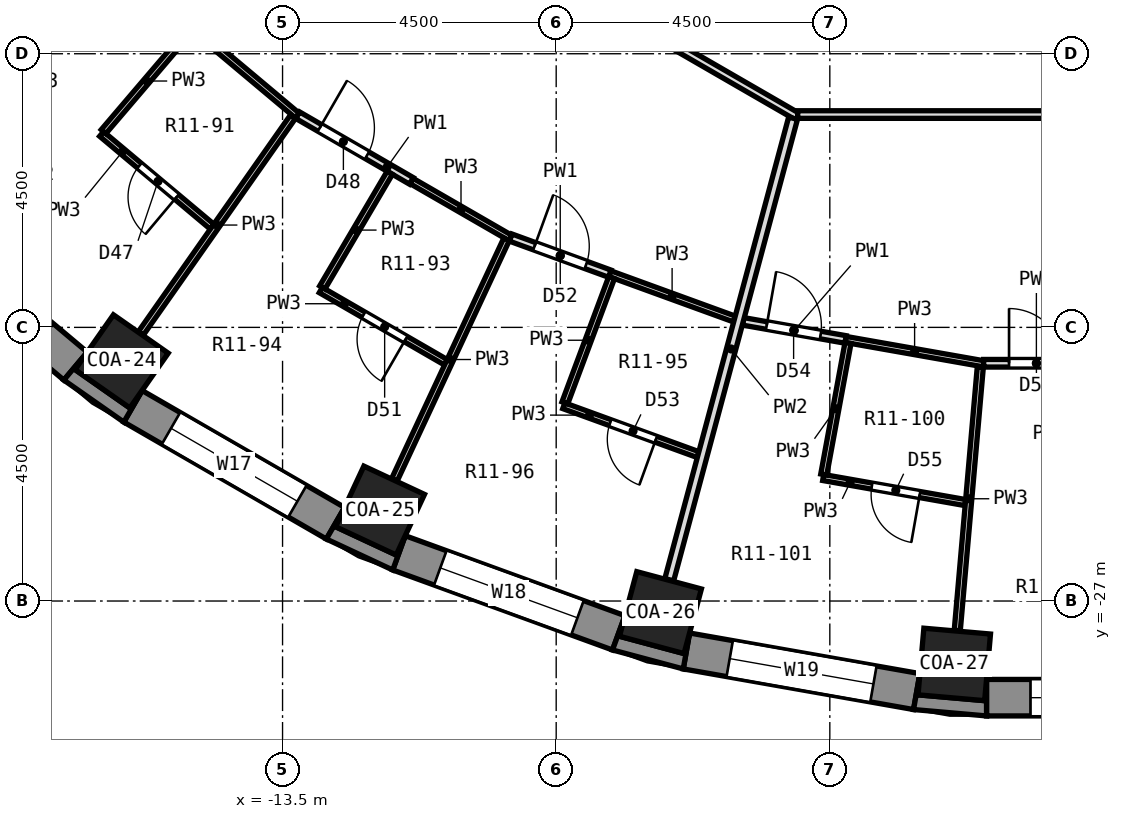
"""IFC4 building model, lengths in metres.
Left out: names, types, materials, properties, quantities, classifications, styles, units other than length and angle.
Written with IfcOpenShell. Run it as: python <this file> out.ifc"""

import sys

from ifc_helpers import new_model, si_unit, direction, frame, frame_2d, origin, origin_2d, place, context, subcontext, project, spatial, polyline, rectangle, outline, extrude, element, fill, save


model = new_model("IFC4")
c1 = context("Model", 3, precision=1e-05, world=origin(), true_north=direction((0.0, 1.0)))
c2 = subcontext(c1, "Body", "Model", "MODEL_VIEW")
j1 = project(units=[si_unit("LENGTHUNIT", "METRE"), si_unit("PLANEANGLEUNIT", "RADIAN")], contexts=[c1])
p1 = place(None, origin())
s1 = spatial("IfcSite", under=j1, at=p1, CompositionType="ELEMENT")
p2 = place(p1, origin())
s2 = spatial("IfcBuilding", under=s1, at=p2, CompositionType="ELEMENT")
p3 = place(p2, frame((0.0, 0.0, 46.1)))
s3 = spatial("IfcBuildingStorey", under=s2, at=p3, CompositionType="ELEMENT", Elevation=46.1)
for number, where, z_axis, x_axis in (
    (1, (-16.146, -23.059, 0.0), (0.0, 0.0, 1.0), (-0.574, -0.819, 0.0)),
    (2, (-11.897, -25.512, 0.0), (0.0, 0.0, 1.0), (-0.423, -0.906, 0.0)),
    (3, (-7.286, -27.191, 0.0), (0.0, 0.0, 1.0), (-0.259, -0.966, 0.0)),
    (4, (-2.453, -28.043, 0.0), (0.0, 0.0, 1.0), (-0.087, -0.996, 0.0)),
):
    element("IfcColumn", number, at=place(p3, frame(where, z_axis=z_axis, x_axis=x_axis)), inside=s3, PredefinedType="COLUMN", context=c2, shape_type="SweptSolid", body=[
        extrude(rectangle(XDim=1.1, YDim=1.1, at=origin_2d()), origin(), (0.0, 0.0, 1.0), 3.3),
    ])
p4 = place(p3, frame((-19.85, -20.665, 0.0), z_axis=(0.0, 0.0, 1.0), x_axis=(0.766026164483, -0.642809392687, 0.0)))
e5 = element("IfcWall", 5, at=p4, inside=s3, PredefinedType="SOLIDWALL", context=c2, shape_type="SweptSolid", body=[
    extrude(rectangle(XDim=3.846, YDim=0.6, at=frame_2d((1.923, 0.0))), origin(), (0.0, 0.0, 1.0), 2.75),
])
p5 = place(p4, frame((0.723, 0.0, 0.9)))
e6 = element("IfcOpeningElement", 6, at=p5, cuts=e5, PredefinedType="OPENING", context=c2, shape_type="SweptSolid", body=[
    extrude(rectangle(XDim=2.4, YDim=1.8, at=frame_2d((1.2, 0.9))), frame((0.0, 0.312, 0.0), z_axis=(0.0, -1.0, 0.0), x_axis=(1.0, 0.0, 0.0)), (0.0, 0.0, 1.0), 0.624),
])
p6 = place(p3, frame((-15.96, -23.798, 0.0), z_axis=(0.0, 0.0, 1.0), x_axis=(0.86603124159, -0.499989888488, 0.0)))
e7 = element("IfcWall", 7, at=p6, inside=s3, PredefinedType="SOLIDWALL", context=c2, shape_type="SweptSolid", body=[
    extrude(rectangle(XDim=3.846, YDim=0.6, at=frame_2d((1.923, 0.0))), origin(), (0.0, 0.0, 1.0), 2.75),
])
p7 = place(p6, frame((0.723, 0.0, 0.9)))
e8 = element("IfcOpeningElement", 8, at=p7, cuts=e7, PredefinedType="OPENING", context=c2, shape_type="SweptSolid", body=[
    extrude(rectangle(XDim=2.4, YDim=1.8, at=frame_2d((1.2, 0.9))), frame((0.0, 0.312, 0.0), z_axis=(0.0, -1.0, 0.0), x_axis=(1.0, 0.0, 0.0)), (0.0, 0.0, 1.0), 0.624),
])
p8 = place(p3, frame((-11.585, -26.208, 0.0), z_axis=(0.0, 0.0, 1.0), x_axis=(0.939689588564, -0.342028474173, 0.0)))
e9 = element("IfcWall", 9, at=p8, inside=s3, PredefinedType="SOLIDWALL", context=c2, shape_type="SweptSolid", body=[
    extrude(rectangle(XDim=3.846, YDim=0.6, at=frame_2d((1.923, 0.0))), origin(), (0.0, 0.0, 1.0), 2.75),
])
p9 = place(p8, frame((0.723, 0.0, 0.9)))
e10 = element("IfcOpeningElement", 10, at=p9, cuts=e9, PredefinedType="OPENING", context=c2, shape_type="SweptSolid", body=[
    extrude(rectangle(XDim=2.4, YDim=1.8, at=frame_2d((1.2, 0.9))), frame((0.0, 0.312, 0.0), z_axis=(0.0, -1.0, 0.0), x_axis=(1.0, 0.0, 0.0)), (0.0, 0.0, 1.0), 0.624),
])
p10 = place(p3, frame((-6.858, -27.821, 0.0), z_axis=(0.0, 0.0, 1.0), x_axis=(0.984800809218, -0.173687553279, 0.0)))
e11 = element("IfcWall", 11, at=p10, inside=s3, PredefinedType="SOLIDWALL", context=c2, shape_type="SweptSolid", body=[
    extrude(rectangle(XDim=3.846, YDim=0.6, at=frame_2d((1.923, 0.0))), origin(), (0.0, 0.0, 1.0), 2.75),
])
p11 = place(p10, frame((0.723, 0.0, 0.9)))
e12 = element("IfcOpeningElement", 12, at=p11, cuts=e11, PredefinedType="OPENING", context=c2, shape_type="SweptSolid", body=[
    extrude(rectangle(XDim=2.4, YDim=1.8, at=frame_2d((1.2, 0.9))), frame((0.0, 0.312, 0.0), z_axis=(0.0, -1.0, 0.0), x_axis=(1.0, 0.0, 0.0)), (0.0, 0.0, 1.0), 0.624),
])
p12 = place(p3, frame((-1.923, -28.59, 0.0), z_axis=(0.0, 0.0, 1.0), x_axis=(1.0, 0.0, 0.0)))
e13 = element("IfcWall", 13, at=p12, inside=s3, PredefinedType="SOLIDWALL", context=c2, shape_type="SweptSolid", body=[
    extrude(rectangle(XDim=3.846, YDim=0.6, at=frame_2d((1.923, 0.0))), origin(), (0.0, 0.0, 1.0), 2.75),
])
p13 = place(p12, frame((0.723, 0.0, 0.9)))
e14 = element("IfcOpeningElement", 14, at=p13, cuts=e13, PredefinedType="OPENING", context=c2, shape_type="SweptSolid", body=[
    extrude(rectangle(XDim=2.4, YDim=1.8, at=frame_2d((1.2, 0.9))), frame((0.0, 0.312, 0.0), z_axis=(0.0, -1.0, 0.0), x_axis=(1.0, 0.0, 0.0)), (0.0, 0.0, 1.0), 0.624),
])
p14 = place(p3, origin())
e15 = element("IfcWall", 15, at=p14, inside=s3, PredefinedType="SOLIDWALL", context=c2, shape_type="SweptSolid", body=[
    extrude(outline(polyline([(-17.097, -23.367), (-16.11, -24.058), (-15.81, -23.538), (-16.011, -23.825), (-16.912, -23.194), (-16.711, -22.907), (-17.097, -23.367)])), origin(), (0.0, 0.0, 1.0), 2.75),
])
p15 = place(p3, origin())
e16 = element("IfcWall", 16, at=p15, inside=s3, PredefinedType="SOLIDWALL", context=c2, shape_type="SweptSolid", body=[
    extrude(outline(polyline([(-11.688, -26.49), (-11.483, -25.926), (-11.631, -26.243), (-12.628, -25.779), (-12.479, -25.461), (-12.78, -25.981), (-11.688, -26.49)])), origin(), (0.0, 0.0, 1.0), 2.75),
])
p16 = place(p3, origin())
e17 = element("IfcWall", 17, at=p16, inside=s3, PredefinedType="SOLIDWALL", context=c2, shape_type="SweptSolid", body=[
    extrude(outline(polyline([(-6.91, -28.117), (-6.806, -27.526), (-6.897, -27.865), (-7.959, -27.58), (-7.869, -27.241), (-8.074, -27.805), (-6.91, -28.117)])), origin(), (0.0, 0.0, 1.0), 2.75),
])
p17 = place(p3, origin())
e18 = element("IfcWall", 18, at=p17, inside=s3, PredefinedType="SOLIDWALL", context=c2, shape_type="SweptSolid", body=[
    extrude(outline(polyline([(-3.123, -28.785), (-1.923, -28.89), (-1.923, -28.29), (-1.954, -28.639), (-3.049, -28.543), (-3.019, -28.194), (-3.123, -28.785)])), origin(), (0.0, 0.0, 1.0), 2.75),
])
p18 = place(p3, frame((-16.476, -19.319, 0.0), z_axis=(0.0, 0.0, 1.0), x_axis=(0.766109873163, -0.642709625136, 0.0)))
e19 = element("IfcWall", 19, at=p18, inside=s3, PredefinedType="PARTITIONING", context=c2, shape_type="SweptSolid", body=[
    extrude(rectangle(XDim=2.374, YDim=0.1, at=frame_2d((1.187, 0.0))), origin(), (0.0, 0.0, 1.0), 2.75),
])
p19 = place(p18, frame((0.812, 0.0, 0.0)))
e20 = element("IfcOpeningElement", 20, at=p19, cuts=e19, PredefinedType="OPENING", context=c2, shape_type="SweptSolid", body=[
    extrude(rectangle(XDim=0.8, YDim=2.1, at=frame_2d((0.4, 1.05))), frame((0.0, 0.062, 0.0), z_axis=(0.0, -1.0, 0.0), x_axis=(1.0, 0.0, 0.0)), (0.0, 0.0, 1.0), 0.124),
])
p20 = place(p3, frame((-15.021, -17.537, 0.0), z_axis=(0.0, 0.0, 1.0), x_axis=(0.766099024104, -0.642722556993, 0.0)))
e21 = element("IfcWall", 21, at=p20, inside=s3, PredefinedType="PARTITIONING", context=c2, shape_type="SweptSolid", body=[
    extrude(rectangle(XDim=2.305, YDim=0.1, at=frame_2d((1.153, 0.0))), origin(), (0.0, 0.0, 1.0), 2.75),
])
p21 = place(p3, frame((-12.871, -21.886, 0.0), z_axis=(0.0, 0.0, 1.0), x_axis=(0.865944213836, -0.500140598757, 0.0)))
e22 = element("IfcWall", 22, at=p21, inside=s3, PredefinedType="PARTITIONING", context=c2, shape_type="SweptSolid", body=[
    extrude(rectangle(XDim=2.375, YDim=0.1, at=frame_2d((1.188, 0.0))), origin(), (0.0, 0.0, 1.0), 2.75),
])
p22 = place(p21, frame((0.812, 0.0, 0.0)))
e23 = element("IfcOpeningElement", 23, at=p22, cuts=e22, PredefinedType="OPENING", context=c2, shape_type="SweptSolid", body=[
    extrude(rectangle(XDim=0.8, YDim=2.1, at=frame_2d((0.4, 1.05))), frame((0.0, 0.062, 0.0), z_axis=(0.0, -1.0, 0.0), x_axis=(1.0, 0.0, 0.0)), (0.0, 0.0, 1.0), 0.124),
])
p23 = place(p3, frame((-11.38, -20.091, 0.0), z_axis=(0.0, 0.0, 1.0), x_axis=(0.866207192616, -0.499685000235, 0.0)))
e24 = element("IfcWall", 24, at=p23, inside=s3, PredefinedType="PARTITIONING", context=c2, shape_type="SweptSolid", body=[
    extrude(rectangle(XDim=1.881, YDim=0.1, at=frame_2d((0.94, 0.0))), origin(), (0.0, 0.0, 1.0), 2.75),
])
p24 = place(p3, frame((-13.251, -19.011, 0.0), z_axis=(0.0, 0.0, 1.0), x_axis=(0.865854192141, -0.500296430081, 0.0)))
e25 = element("IfcWall", 25, at=p24, inside=s3, PredefinedType="PARTITIONING", context=c2, shape_type="SweptSolid", body=[
    extrude(rectangle(XDim=2.16, YDim=0.125, at=frame_2d((1.08, 0.0))), origin(), (0.0, 0.0, 1.0), 2.75),
])
p25 = place(p24, frame((0.417, 0.0, 0.0)))
e26 = element("IfcOpeningElement", 26, at=p25, cuts=e25, PredefinedType="OPENING", context=c2, shape_type="SweptSolid", body=[
    extrude(rectangle(XDim=0.9, YDim=2.1, at=frame_2d((0.45, 1.05))), frame((0.0, 0.074, 0.0), z_axis=(0.0, -1.0, 0.0), x_axis=(1.0, 0.0, 0.0)), (0.0, 0.0, 1.0), 0.149),
])
p26 = place(p3, frame((-13.855, -13.94, 0.0), z_axis=(0.0, 0.0, 1.0), x_axis=(0.866024825845, -0.50000100102, 0.0)))
e27 = element("IfcWall", 27, at=p26, inside=s3, PredefinedType="PARTITIONING", context=c2, shape_type="SweptSolid", body=[
    extrude(rectangle(XDim=10.192, YDim=0.125, at=frame_2d((5.096, 0.0))), origin(), (0.0, 0.0, 1.0), 2.75),
])
p27 = place(p3, frame((-8.875, -23.789, 0.0), z_axis=(0.0, 0.0, 1.0), x_axis=(0.939775222713, -0.341793111069, 0.0)))
e28 = element("IfcWall", 28, at=p27, inside=s3, PredefinedType="PARTITIONING", context=c2, shape_type="SweptSolid", body=[
    extrude(rectangle(XDim=2.35, YDim=0.1, at=frame_2d((1.175, 0.0))), origin(), (0.0, 0.0, 1.0), 2.75),
])
p28 = place(p27, frame((0.812, 0.0, 0.0)))
e29 = element("IfcOpeningElement", 29, at=p28, cuts=e28, PredefinedType="OPENING", context=c2, shape_type="SweptSolid", body=[
    extrude(rectangle(XDim=0.8, YDim=2.1, at=frame_2d((0.4, 1.05))), frame((0.0, 0.062, 0.0), z_axis=(0.0, -1.0, 0.0), x_axis=(1.0, 0.0, 0.0)), (0.0, 0.0, 1.0), 0.124),
])
p29 = place(p3, frame((-8.118, -21.617, 0.0), z_axis=(0.0, 0.0, 1.0), x_axis=(0.939718185991, -0.341949895332, 0.0)))
e30 = element("IfcWall", 30, at=p29, inside=s3, PredefinedType="PARTITIONING", context=c2, shape_type="SweptSolid", body=[
    extrude(rectangle(XDim=2.18, YDim=0.1, at=frame_2d((1.09, 0.0))), origin(), (0.0, 0.0, 1.0), 2.75),
])
p30 = place(p3, frame((-9.748, -21.023, 0.0), z_axis=(0.0, 0.0, 1.0), x_axis=(0.939612508188, -0.342240170722, 0.0)))
e31 = element("IfcWall", 31, at=p30, inside=s3, PredefinedType="PARTITIONING", context=c2, shape_type="SweptSolid", body=[
    extrude(rectangle(XDim=1.735, YDim=0.125, at=frame_2d((0.867, 0.0))), origin(), (0.0, 0.0, 1.0), 2.75),
])
p31 = place(p30, frame((0.417, 0.0, 0.0)))
e32 = element("IfcOpeningElement", 32, at=p31, cuts=e31, PredefinedType="OPENING", context=c2, shape_type="SweptSolid", body=[
    extrude(rectangle(XDim=0.9, YDim=2.1, at=frame_2d((0.45, 1.05))), frame((0.0, 0.074, 0.0), z_axis=(0.0, -1.0, 0.0), x_axis=(1.0, 0.0, 0.0)), (0.0, 0.0, 1.0), 0.149),
])
p32 = place(p3, frame((-4.609, -24.969, 0.0), z_axis=(0.0, 0.0, 1.0), x_axis=(0.984808388541, -0.173644573363, 0.0)))
e33 = element("IfcWall", 33, at=p32, inside=s3, PredefinedType="PARTITIONING", context=c2, shape_type="SweptSolid", body=[
    extrude(rectangle(XDim=2.375, YDim=0.1, at=frame_2d((1.188, 0.0))), origin(), (0.0, 0.0, 1.0), 2.75),
])
p33 = place(p32, frame((0.812, 0.0, 0.0)))
e34 = element("IfcOpeningElement", 34, at=p33, cuts=e33, PredefinedType="OPENING", context=c2, shape_type="SweptSolid", body=[
    extrude(rectangle(XDim=0.8, YDim=2.1, at=frame_2d((0.4, 1.05))), frame((0.0, 0.062, 0.0), z_axis=(0.0, -1.0, 0.0), x_axis=(1.0, 0.0, 0.0)), (0.0, 0.0, 1.0), 0.124),
])
p34 = place(p3, frame((-4.241, -22.698, 0.0), z_axis=(0.0, 0.0, 1.0), x_axis=(0.984796344358, -0.173712866935, 0.0)))
e35 = element("IfcWall", 35, at=p34, inside=s3, PredefinedType="PARTITIONING", context=c2, shape_type="SweptSolid", body=[
    extrude(rectangle(XDim=2.306, YDim=0.1, at=frame_2d((1.153, 0.0))), origin(), (0.0, 0.0, 1.0), 2.75),
])
p35 = place(p3, frame((-5.925, -22.401, 0.0), z_axis=(0.0, 0.0, 1.0), x_axis=(0.984786433544, -0.173769043008, 0.0)))
e36 = element("IfcWall", 36, at=p35, inside=s3, PredefinedType="PARTITIONING", context=c2, shape_type="SweptSolid", body=[
    extrude(rectangle(XDim=1.71, YDim=0.125, at=frame_2d((0.855, 0.0))), origin(), (0.0, 0.0, 1.0), 2.75),
])
p36 = place(p35, frame((0.393, 0.0, 0.0)))
e37 = element("IfcOpeningElement", 37, at=p36, cuts=e36, PredefinedType="OPENING", context=c2, shape_type="SweptSolid", body=[
    extrude(rectangle(XDim=0.9, YDim=2.1, at=frame_2d((0.45, 1.05))), frame((0.0, 0.074, 0.0), z_axis=(0.0, -1.0, 0.0), x_axis=(1.0, 0.0, 0.0)), (0.0, 0.0, 1.0), 0.149),
])
p37 = place(p3, frame((-1.97, -23.09, 0.0), z_axis=(0.0, 0.0, 1.0), x_axis=(1.0, 0.0, 0.0)))
e38 = element("IfcWall", 38, at=p37, inside=s3, PredefinedType="PARTITIONING", context=c2, shape_type="SweptSolid", body=[
    extrude(rectangle(XDim=1.735, YDim=0.125, at=frame_2d((0.867, 0.0))), origin(), (0.0, 0.0, 1.0), 2.75),
])
p38 = place(p37, frame((0.417, 0.0, 0.0)))
e39 = element("IfcOpeningElement", 39, at=p38, cuts=e38, PredefinedType="OPENING", context=c2, shape_type="SweptSolid", body=[
    extrude(rectangle(XDim=0.9, YDim=2.1, at=frame_2d((0.45, 1.05))), frame((0.0, 0.074, 0.0), z_axis=(0.0, -1.0, 0.0), x_axis=(1.0, 0.0, 0.0)), (0.0, 0.0, 1.0), 0.149),
])
p39 = place(p3, frame((-5.029, -19.0, 0.0), z_axis=(0.0, 0.0, 1.0), x_axis=(1.0, 0.0, 0.0)))
e40 = element("IfcWall", 40, at=p39, inside=s3, PredefinedType="PARTITIONING", context=c2, shape_type="SweptSolid", body=[
    extrude(rectangle(XDim=10.192, YDim=0.125, at=frame_2d((5.096, 0.0))), origin(), (0.0, 0.0, 1.0), 2.75),
])
p40 = place(p3, frame((-19.509, -19.509, 0.0), z_axis=(0.0, 0.0, 1.0), x_axis=(0.707106781187, 0.707106781187, 0.0)))
e41 = element("IfcWall", 41, at=p40, inside=s3, PredefinedType="PARTITIONING", context=c2, shape_type="SweptSolid", body=[
    extrude(rectangle(XDim=4.35, YDim=0.1, at=frame_2d((2.175, 0.0))), origin(), (0.0, 0.0, 1.0), 2.75),
])
p41 = place(p3, frame((-16.444, -19.281, 0.0), z_axis=(0.0, 0.0, 1.0), x_axis=(0.648988401233, 0.760798301171, 0.0)))
e42 = element("IfcWall", 42, at=p41, inside=s3, PredefinedType="PARTITIONING", context=c2, shape_type="SweptSolid", body=[
    extrude(rectangle(XDim=2.188, YDim=0.1, at=frame_2d((1.094, 0.0))), origin(), (0.0, 0.0, 1.0), 2.75),
])
p42 = place(p3, frame((-15.829, -22.597, 0.0), z_axis=(0.0, 0.0, 1.0), x_axis=(0.574588030597, 0.818442786696, 0.0)))
e43 = element("IfcWall", 43, at=p42, inside=s3, PredefinedType="PARTITIONING", context=c2, shape_type="SweptSolid", body=[
    extrude(rectangle(XDim=4.35, YDim=0.1, at=frame_2d((2.175, 0.0))), origin(), (0.0, 0.0, 1.0), 2.75),
])
p43 = place(p3, frame((-12.846, -21.843, 0.0), z_axis=(0.0, 0.0, 1.0), x_axis=(0.507073781844, 0.86190265098, 0.0)))
e44 = element("IfcWall", 44, at=p43, inside=s3, PredefinedType="PARTITIONING", context=c2, shape_type="SweptSolid", body=[
    extrude(rectangle(XDim=2.187, YDim=0.1, at=frame_2d((1.094, 0.0))), origin(), (0.0, 0.0, 1.0), 2.75),
])
p44 = place(p3, frame((-11.66, -25.005, 0.0), z_axis=(0.0, 0.0, 1.0), x_axis=(0.422625040743, 0.906304625905, 0.0)))
e45 = element("IfcWall", 45, at=p44, inside=s3, PredefinedType="PARTITIONING", context=c2, shape_type="SweptSolid", body=[
    extrude(rectangle(XDim=4.363, YDim=0.1, at=frame_2d((2.181, 0.0))), origin(), (0.0, 0.0, 1.0), 2.75),
])
p45 = place(p3, frame((-8.857, -23.742, 0.0), z_axis=(0.0, 0.0, 1.0), x_axis=(0.349554173345, 0.936916154144, 0.0)))
e46 = element("IfcWall", 46, at=p45, inside=s3, PredefinedType="PARTITIONING", context=c2, shape_type="SweptSolid", body=[
    extrude(rectangle(XDim=2.2, YDim=0.1, at=frame_2d((1.1, 0.0))), origin(), (0.0, 0.0, 1.0), 2.75),
])
p46 = place(p3, frame((-7.141, -26.65, 0.0), z_axis=(0.0, 0.0, 1.0), x_axis=(0.259110891803, 0.965847578943, 0.0)))
e47 = element("IfcWall", 47, at=p46, inside=s3, PredefinedType="PARTITIONING", context=c2, shape_type="SweptSolid", body=[
    extrude(rectangle(XDim=7.857, YDim=0.15, at=frame_2d((3.929, 0.0))), origin(), (0.0, 0.0, 1.0), 2.75),
])
p47 = place(p3, frame((-4.6, -24.92, 0.0), z_axis=(0.0, 0.0, 1.0), x_axis=(0.181199143807, 0.983446424714, 0.0)))
e48 = element("IfcWall", 48, at=p47, inside=s3, PredefinedType="PARTITIONING", context=c2, shape_type="SweptSolid", body=[
    extrude(rectangle(XDim=2.2, YDim=0.1, at=frame_2d((1.1, 0.0))), origin(), (0.0, 0.0, 1.0), 2.75),
])
p48 = place(p3, frame((-2.404, -27.485, 0.0), z_axis=(0.0, 0.0, 1.0), x_axis=(0.087174609927, 0.996193047247, 0.0)))
e49 = element("IfcWall", 49, at=p48, inside=s3, PredefinedType="PARTITIONING", context=c2, shape_type="SweptSolid", body=[
    extrude(rectangle(XDim=4.349, YDim=0.1, at=frame_2d((2.175, 0.0))), origin(), (0.0, 0.0, 1.0), 2.75),
])
p49 = place(p7, origin())
e50 = element("IfcWindow", 50, at=p49, inside=s3, PartitioningType="SINGLE_PANEL", PredefinedType="WINDOW", context=c2, shape_type="SweptSolid", body=[
    extrude(rectangle(XDim=2.4, YDim=1.8, at=frame_2d((1.2, 0.9))), frame((0.0, 0.18, 0.0), z_axis=(0.0, -1.0, 0.0), x_axis=(1.0, 0.0, 0.0)), (0.0, 0.0, 1.0), 0.06),
])
fill(e8, e50)
p50 = place(p9, origin())
e51 = element("IfcWindow", 51, at=p50, inside=s3, PartitioningType="SINGLE_PANEL", PredefinedType="WINDOW", context=c2, shape_type="SweptSolid", body=[
    extrude(rectangle(XDim=2.4, YDim=1.8, at=frame_2d((1.2, 0.9))), frame((0.0, 0.18, 0.0), z_axis=(0.0, -1.0, 0.0), x_axis=(1.0, 0.0, 0.0)), (0.0, 0.0, 1.0), 0.06),
])
fill(e10, e51)
p51 = place(p11, origin())
e52 = element("IfcWindow", 52, at=p51, inside=s3, PartitioningType="SINGLE_PANEL", PredefinedType="WINDOW", context=c2, shape_type="SweptSolid", body=[
    extrude(rectangle(XDim=2.4, YDim=1.8, at=frame_2d((1.2, 0.9))), frame((0.0, 0.18, 0.0), z_axis=(0.0, -1.0, 0.0), x_axis=(1.0, 0.0, 0.0)), (0.0, 0.0, 1.0), 0.06),
])
fill(e12, e52)
p52 = place(p13, origin())
e53 = element("IfcWindow", 53, at=p52, inside=s3, PartitioningType="SINGLE_PANEL", PredefinedType="WINDOW", context=c2, shape_type="SweptSolid", body=[
    extrude(rectangle(XDim=2.4, YDim=1.8, at=frame_2d((1.2, 0.9))), frame((0.0, 0.18, 0.0), z_axis=(0.0, -1.0, 0.0), x_axis=(1.0, 0.0, 0.0)), (0.0, 0.0, 1.0), 0.06),
])
fill(e14, e53)
p53 = place(p19, frame((0.8, 0.0, 0.0), z_axis=(0.0, 0.0, 1.0), x_axis=(-1.0, 0.0, 0.0)))
e54 = element("IfcDoor", 54, at=p53, inside=s3, OperationType="SINGLE_SWING_LEFT", PredefinedType="DOOR", context=c2, shape_type="SweptSolid", body=[
    extrude(rectangle(XDim=0.8, YDim=2.1, at=frame_2d((0.4, 1.05))), frame((0.0, 0.025, 0.0), z_axis=(0.0, -1.0, 0.0), x_axis=(1.0, 0.0, 0.0)), (0.0, 0.0, 1.0), 0.05),
])
fill(e20, e54)
p54 = place(p25, origin())
e55 = element("IfcDoor", 55, at=p54, inside=s3, OperationType="SINGLE_SWING_LEFT", PredefinedType="DOOR", context=c2, shape_type="SweptSolid", body=[
    extrude(rectangle(XDim=0.9, YDim=2.1, at=frame_2d((0.45, 1.05))), frame((0.0, 0.025, 0.0), z_axis=(0.0, -1.0, 0.0), x_axis=(1.0, 0.0, 0.0)), (0.0, 0.0, 1.0), 0.05),
])
fill(e26, e55)
p55 = place(p22, frame((0.8, 0.0, 0.0), z_axis=(0.0, 0.0, 1.0), x_axis=(-1.0, 0.0, 0.0)))
e56 = element("IfcDoor", 56, at=p55, inside=s3, OperationType="SINGLE_SWING_LEFT", PredefinedType="DOOR", context=c2, shape_type="SweptSolid", body=[
    extrude(rectangle(XDim=0.8, YDim=2.1, at=frame_2d((0.4, 1.05))), frame((0.0, 0.025, 0.0), z_axis=(0.0, -1.0, 0.0), x_axis=(1.0, 0.0, 0.0)), (0.0, 0.0, 1.0), 0.05),
])
fill(e23, e56)
p56 = place(p31, origin())
e57 = element("IfcDoor", 57, at=p56, inside=s3, OperationType="SINGLE_SWING_LEFT", PredefinedType="DOOR", context=c2, shape_type="SweptSolid", body=[
    extrude(rectangle(XDim=0.9, YDim=2.1, at=frame_2d((0.45, 1.05))), frame((0.0, 0.025, 0.0), z_axis=(0.0, -1.0, 0.0), x_axis=(1.0, 0.0, 0.0)), (0.0, 0.0, 1.0), 0.05),
])
fill(e32, e57)
p57 = place(p28, frame((0.8, 0.0, 0.0), z_axis=(0.0, 0.0, 1.0), x_axis=(-1.0, 0.0, 0.0)))
e58 = element("IfcDoor", 58, at=p57, inside=s3, OperationType="SINGLE_SWING_LEFT", PredefinedType="DOOR", context=c2, shape_type="SweptSolid", body=[
    extrude(rectangle(XDim=0.8, YDim=2.1, at=frame_2d((0.4, 1.05))), frame((0.0, 0.025, 0.0), z_axis=(0.0, -1.0, 0.0), x_axis=(1.0, 0.0, 0.0)), (0.0, 0.0, 1.0), 0.05),
])
fill(e29, e58)
p58 = place(p36, origin())
e59 = element("IfcDoor", 59, at=p58, inside=s3, OperationType="SINGLE_SWING_LEFT", PredefinedType="DOOR", context=c2, shape_type="SweptSolid", body=[
    extrude(rectangle(XDim=0.9, YDim=2.1, at=frame_2d((0.45, 1.05))), frame((0.0, 0.025, 0.0), z_axis=(0.0, -1.0, 0.0), x_axis=(1.0, 0.0, 0.0)), (0.0, 0.0, 1.0), 0.05),
])
fill(e37, e59)
p59 = place(p33, frame((0.8, 0.0, 0.0), z_axis=(0.0, 0.0, 1.0), x_axis=(-1.0, 0.0, 0.0)))
e60 = element("IfcDoor", 60, at=p59, inside=s3, OperationType="SINGLE_SWING_LEFT", PredefinedType="DOOR", context=c2, shape_type="SweptSolid", body=[
    extrude(rectangle(XDim=0.8, YDim=2.1, at=frame_2d((0.4, 1.05))), frame((0.0, 0.025, 0.0), z_axis=(0.0, -1.0, 0.0), x_axis=(1.0, 0.0, 0.0)), (0.0, 0.0, 1.0), 0.05),
])
fill(e34, e60)
p60 = place(p38, origin())
e61 = element("IfcDoor", 61, at=p60, inside=s3, OperationType="SINGLE_SWING_LEFT", PredefinedType="DOOR", context=c2, shape_type="SweptSolid", body=[
    extrude(rectangle(XDim=0.9, YDim=2.1, at=frame_2d((0.45, 1.05))), frame((0.0, 0.025, 0.0), z_axis=(0.0, -1.0, 0.0), x_axis=(1.0, 0.0, 0.0)), (0.0, 0.0, 1.0), 0.05),
])
fill(e39, e61)
save(model, sys.argv[1])
